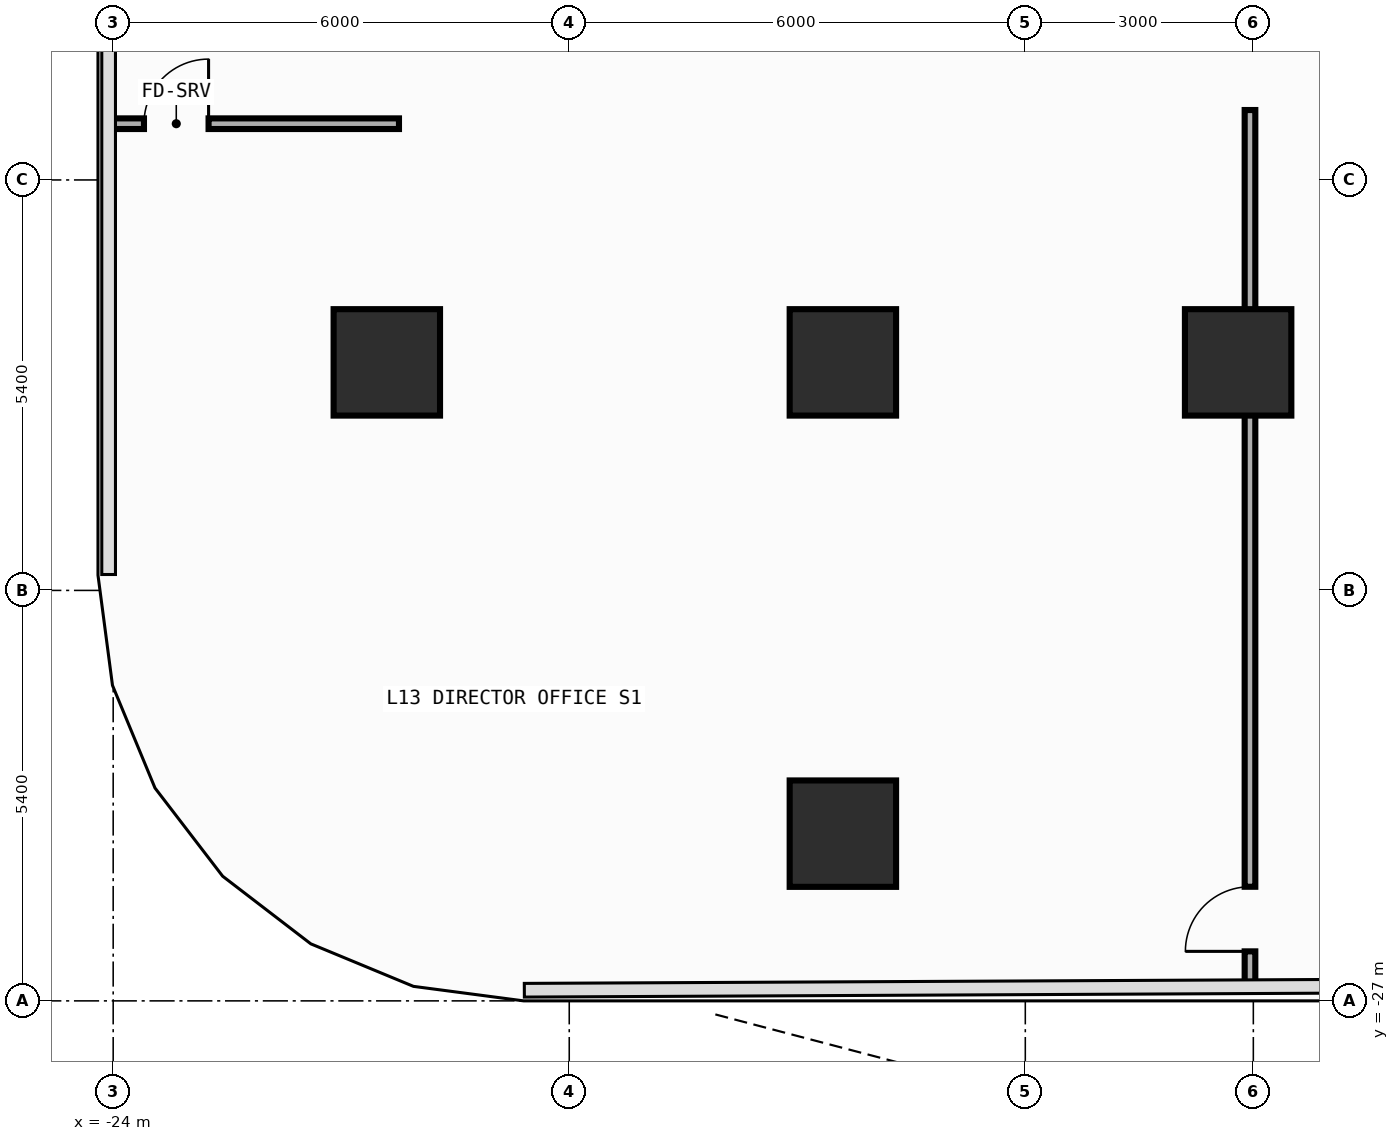
"""IFC4 building model, lengths in metres.
Left out: names, types, materials, properties, quantities, classifications, styles, units other than length and angle.
Written with IfcOpenShell. Run it as: python <this file> out.ifc"""

import sys

from ifc_helpers import new_model, si_unit, direction, frame, frame_2d, origin, origin_2d, place, context, subcontext, project, spatial, rectangle, extrude, element, fill, save


model = new_model("IFC4")
c1 = context("Model", 3, precision=1e-05, world=origin(), true_north=direction((0.0, 1.0)))
c2 = subcontext(c1, "Body", "Model", "MODEL_VIEW")
j1 = project(units=[si_unit("LENGTHUNIT", "METRE"), si_unit("PLANEANGLEUNIT", "RADIAN")], contexts=[c1])
p1 = place(None, origin())
s1 = spatial("IfcSite", under=j1, at=p1, CompositionType="ELEMENT")
p2 = place(p1, origin())
s2 = spatial("IfcBuilding", under=s1, at=p2, CompositionType="ELEMENT")
p3 = place(p2, frame((0.0, 0.0, 55.4)))
s3 = spatial("IfcBuildingStorey", under=s2, at=p3, CompositionType="ELEMENT", Elevation=55.4)
for number, where, z_axis, x_axis in (
    (1, (-9.2, -18.6, 0.0), (0.0, 0.0, 1.0), (1.0, 0.0, 0.0)),
    (2, (-20.4, -18.6, 0.0), (0.0, 0.0, 1.0), (1.0, 0.0, 0.0)),
    (3, (-14.4, -18.6, 0.0), (0.0, 0.0, 1.0), (1.0, 0.0, 0.0)),
    (4, (-14.4, -24.8, 0.0), (0.0, 0.0, 1.0), (1.0, 0.0, 0.0)),
):
    element("IfcColumn", number, at=place(p3, frame(where, z_axis=z_axis, x_axis=x_axis)), inside=s3, PredefinedType="COLUMN", context=c2, shape_type="SweptSolid", body=[
        extrude(rectangle(XDim=1.4, YDim=1.4, at=origin_2d()), origin(), (0.0, 0.0, 1.0), 4.2),
    ])
p4 = place(p3, frame((-24.055, -15.46, 0.0), z_axis=(0.0, 0.0, 1.0), x_axis=(1.0, 0.0, 0.0)))
e5 = element("IfcWall", 5, at=p4, inside=s3, PredefinedType="PARTITIONING", context=c2, shape_type="SweptSolid", body=[
    extrude(rectangle(XDim=3.815, YDim=0.14, at=frame_2d((1.907, 0.0))), origin(), (0.0, 0.0, 1.0), 3.94),
])
p5 = place(p4, frame((0.46, 0.0, 0.0)))
e6 = element("IfcOpeningElement", 6, at=p5, cuts=e5, PredefinedType="OPENING", context=c2, shape_type="SweptSolid", body=[
    extrude(rectangle(XDim=0.85, YDim=2.1, at=frame_2d((0.425, 1.05))), frame((0.0, 0.08, 0.0), z_axis=(0.0, -1.0, 0.0), x_axis=(1.0, 0.0, 0.0)), (0.0, 0.0, 1.0), 0.16),
])
p6 = place(p3, frame((-9.044, -26.809, 0.0), z_axis=(0.0, 0.0, 1.0), x_axis=(0.0, 1.0, 0.0)))
e7 = element("IfcWall", 7, at=p6, inside=s3, PredefinedType="PARTITIONING", context=c2, shape_type="SweptSolid", body=[
    extrude(rectangle(XDim=11.529, YDim=0.14, at=frame_2d((5.764, 0.0))), origin(), (0.0, 0.0, 1.0), 3.14),
])
p7 = place(p6, frame((0.46, 0.0, 0.0)))
e8 = element("IfcOpeningElement", 8, at=p7, cuts=e7, PredefinedType="OPENING", context=c2, shape_type="SweptSolid", body=[
    extrude(rectangle(XDim=0.85, YDim=2.1, at=frame_2d((0.425, 1.05))), frame((0.0, 0.08, 0.0), z_axis=(0.0, -1.0, 0.0), x_axis=(1.0, 0.0, 0.0)), (0.0, 0.0, 1.0), 0.16),
])
p8 = place(p5, origin())
e9 = element("IfcDoor", 9, at=p8, inside=s3, OperationType="SINGLE_SWING_RIGHT", PredefinedType="DOOR", context=c2, shape_type="SweptSolid", body=[
    extrude(rectangle(XDim=0.85, YDim=2.1, at=frame_2d((0.425, 1.05))), frame((0.0, 0.025, 0.0), z_axis=(0.0, -1.0, 0.0), x_axis=(1.0, 0.0, 0.0)), (0.0, 0.0, 1.0), 0.05),
])
fill(e6, e9)
p9 = place(p7, origin())
e10 = element("IfcDoor", 10, at=p9, inside=s3, OperationType="SINGLE_SWING_LEFT", PredefinedType="DOOR", context=c2, shape_type="SweptSolid", body=[
    extrude(rectangle(XDim=0.85, YDim=2.1, at=frame_2d((0.425, 1.05))), frame((0.0, 0.025, 0.0), z_axis=(0.0, -1.0, 0.0), x_axis=(1.0, 0.0, 0.0)), (0.0, 0.0, 1.0), 0.05),
])
fill(e8, e10)
save(model, sys.argv[1])
